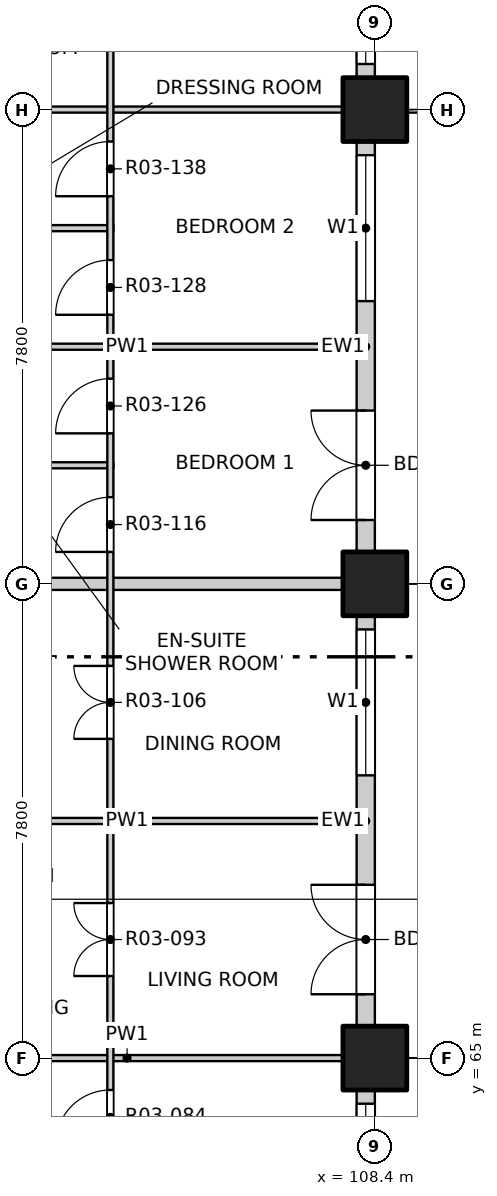
"""IFC4 building model, lengths in metres.
Left out: names, types, materials, properties, quantities, classifications, styles, units other than length and angle.
Written with IfcOpenShell. Run it as: python <this file> out.ifc"""

import sys

from ifc_helpers import new_model, si_unit, direction, frame, frame_2d, origin, origin_2d, place, context, subcontext, project, spatial, rectangle, extrude, element, fill, save


model = new_model("IFC4")
c1 = context("Model", 3, precision=1e-05, world=origin(), true_north=direction((0.0, 1.0)))
c2 = subcontext(c1, "Body", "Model", "MODEL_VIEW")
j1 = project(units=[si_unit("LENGTHUNIT", "METRE"), si_unit("PLANEANGLEUNIT", "RADIAN")], contexts=[c1])
p1 = place(None, origin())
s1 = spatial("IfcSite", under=j1, at=p1, CompositionType="ELEMENT")
p2 = place(p1, origin())
s2 = spatial("IfcBuilding", under=s1, at=p2, CompositionType="ELEMENT")
p3 = place(p2, frame((0.0, 0.0, 43.3)))
s3 = spatial("IfcBuildingStorey", under=s2, at=p3, CompositionType="ELEMENT", Elevation=43.3)
for number, where, z_axis, x_axis in (
    (1, (108.4, 65.0, -0.25), (0.0, 0.0, 1.0), (1.0, 0.0, 0.0)),
    (2, (108.4, 72.8, -0.25), (0.0, 0.0, 1.0), (1.0, 0.0, 0.0)),
    (3, (108.4, 80.6, -0.25), (0.0, 0.0, 1.0), (1.0, 0.0, 0.0)),
):
    element("IfcColumn", number, at=place(p3, frame(where, z_axis=z_axis, x_axis=x_axis)), inside=s3, PredefinedType="COLUMN", context=c2, shape_type="SweptSolid", body=[
        extrude(rectangle(XDim=1.05, YDim=1.05, at=origin_2d()), origin(), (0.0, 0.0, 1.0), 3.35),
    ])
p4 = place(p3, frame((108.25, 57.725, 0.0), z_axis=(0.0, 0.0, 1.0), x_axis=(0.0, 1.0, 0.0)))
e4 = element("IfcWall", 4, at=p4, inside=s3, PredefinedType="SOLIDWALL", context=c2, shape_type="SweptSolid", body=[
    extrude(rectangle(XDim=6.75, YDim=0.3, at=frame_2d((3.375, 0.0))), origin(), (0.0, 0.0, 1.0), 3.1),
])
p5 = place(p4, frame((0.525, 0.0, 0.0)))
e5 = element("IfcOpeningElement", 5, at=p5, cuts=e4, PredefinedType="OPENING", context=c2, shape_type="SweptSolid", body=[
    extrude(rectangle(XDim=1.8, YDim=2.4, at=frame_2d((0.9, 1.2))), frame((0.0, 0.16, 0.0), z_axis=(0.0, -1.0, 0.0), x_axis=(1.0, 0.0, 0.0)), (0.0, 0.0, 1.0), 0.32),
])
p6 = place(p4, frame((4.125, 0.0, 0.9)))
e6 = element("IfcOpeningElement", 6, at=p6, cuts=e4, PredefinedType="OPENING", context=c2, shape_type="SweptSolid", body=[
    extrude(rectangle(XDim=2.4, YDim=1.8, at=frame_2d((1.2, 0.9))), frame((0.0, 0.16, 0.0), z_axis=(0.0, -1.0, 0.0), x_axis=(1.0, 0.0, 0.0)), (0.0, 0.0, 1.0), 0.32),
])
p7 = place(p3, frame((108.25, 65.525, 0.0), z_axis=(0.0, 0.0, 1.0), x_axis=(0.0, 1.0, 0.0)))
e7 = element("IfcWall", 7, at=p7, inside=s3, PredefinedType="SOLIDWALL", context=c2, shape_type="SweptSolid", body=[
    extrude(rectangle(XDim=6.75, YDim=0.3, at=frame_2d((3.375, 0.0))), origin(), (0.0, 0.0, 1.0), 3.1),
])
p8 = place(p7, frame((0.525, 0.0, 0.0)))
e8 = element("IfcOpeningElement", 8, at=p8, cuts=e7, PredefinedType="OPENING", context=c2, shape_type="SweptSolid", body=[
    extrude(rectangle(XDim=1.8, YDim=2.4, at=frame_2d((0.9, 1.2))), frame((0.0, 0.16, 0.0), z_axis=(0.0, -1.0, 0.0), x_axis=(1.0, 0.0, 0.0)), (0.0, 0.0, 1.0), 0.32),
])
p9 = place(p7, frame((4.125, 0.0, 0.9)))
e9 = element("IfcOpeningElement", 9, at=p9, cuts=e7, PredefinedType="OPENING", context=c2, shape_type="SweptSolid", body=[
    extrude(rectangle(XDim=2.4, YDim=1.8, at=frame_2d((1.2, 0.9))), frame((0.0, 0.16, 0.0), z_axis=(0.0, -1.0, 0.0), x_axis=(1.0, 0.0, 0.0)), (0.0, 0.0, 1.0), 0.32),
])
p10 = place(p3, frame((108.25, 73.325, 0.0), z_axis=(0.0, 0.0, 1.0), x_axis=(0.0, 1.0, 0.0)))
e10 = element("IfcWall", 10, at=p10, inside=s3, PredefinedType="SOLIDWALL", context=c2, shape_type="SweptSolid", body=[
    extrude(rectangle(XDim=6.75, YDim=0.3, at=frame_2d((3.375, 0.0))), origin(), (0.0, 0.0, 1.0), 3.1),
])
p11 = place(p10, frame((0.525, 0.0, 0.0)))
e11 = element("IfcOpeningElement", 11, at=p11, cuts=e10, PredefinedType="OPENING", context=c2, shape_type="SweptSolid", body=[
    extrude(rectangle(XDim=1.8, YDim=2.4, at=frame_2d((0.9, 1.2))), frame((0.0, 0.16, 0.0), z_axis=(0.0, -1.0, 0.0), x_axis=(1.0, 0.0, 0.0)), (0.0, 0.0, 1.0), 0.32),
])
p12 = place(p10, frame((4.125, 0.0, 0.9)))
e12 = element("IfcOpeningElement", 12, at=p12, cuts=e10, PredefinedType="OPENING", context=c2, shape_type="SweptSolid", body=[
    extrude(rectangle(XDim=2.4, YDim=1.8, at=frame_2d((1.2, 0.9))), frame((0.0, 0.16, 0.0), z_axis=(0.0, -1.0, 0.0), x_axis=(1.0, 0.0, 0.0)), (0.0, 0.0, 1.0), 0.32),
])
p13 = place(p3, frame((108.25, 81.125, 0.0), z_axis=(0.0, 0.0, 1.0), x_axis=(0.0, 1.0, 0.0)))
e13 = element("IfcWall", 13, at=p13, inside=s3, PredefinedType="SOLIDWALL", context=c2, shape_type="SweptSolid", body=[
    extrude(rectangle(XDim=3.375, YDim=0.3, at=frame_2d((1.688, 0.0))), origin(), (0.0, 0.0, 1.0), 3.1),
])
p14 = place(p13, frame((0.225, 0.0, 0.9)))
e14 = element("IfcOpeningElement", 14, at=p14, cuts=e13, PredefinedType="OPENING", context=c2, shape_type="SweptSolid", body=[
    extrude(rectangle(XDim=2.4, YDim=1.8, at=frame_2d((1.2, 0.9))), frame((0.0, 0.16, 0.0), z_axis=(0.0, -1.0, 0.0), x_axis=(1.0, 0.0, 0.0)), (0.0, 0.0, 1.0), 0.32),
])
for number, where, z_axis, x_axis in (
    (15, (100.55, 65.0, 0.0), (0.0, 0.0, 1.0), (1.0, 0.0, 0.0)),
    (16, (100.55, 68.9, 0.0), (0.0, 0.0, 1.0), (1.0, 0.0, 0.0)),
):
    element("IfcWall", number, at=place(p3, frame(where, z_axis=z_axis, x_axis=x_axis)), inside=s3, PredefinedType="PARTITIONING", context=c2, shape_type="SweptSolid", body=[
        extrude(rectangle(XDim=7.55, YDim=0.1, at=frame_2d((3.775, 0.0))), origin(), (0.0, 0.0, 1.0), 3.1),
    ])
p15 = place(p3, frame((96.6, 72.8, 0.0), z_axis=(0.0, 0.0, 1.0), x_axis=(1.0, 0.0, 0.0)))
e17 = element("IfcWall", 17, at=p15, inside=s3, PredefinedType="PARTITIONING", context=c2, shape_type="SweptSolid", body=[
    extrude(rectangle(XDim=11.5, YDim=0.2, at=frame_2d((5.75, 0.0))), origin(), (0.0, 0.0, 1.0), 3.1),
])
p16 = place(p3, frame((100.55, 74.75, 0.0), z_axis=(0.0, 0.0, 1.0), x_axis=(1.0, 0.0, 0.0)))
e18 = element("IfcWall", 18, at=p16, inside=s3, PredefinedType="PARTITIONING", context=c2, shape_type="SweptSolid", body=[
    extrude(rectangle(XDim=3.55, YDim=0.1, at=frame_2d((1.775, 0.0))), origin(), (0.0, 0.0, 1.0), 3.1),
])
p17 = place(p3, frame((100.55, 76.7, 0.0), z_axis=(0.0, 0.0, 1.0), x_axis=(1.0, 0.0, 0.0)))
e19 = element("IfcWall", 19, at=p17, inside=s3, PredefinedType="PARTITIONING", context=c2, shape_type="SweptSolid", body=[
    extrude(rectangle(XDim=7.55, YDim=0.1, at=frame_2d((3.775, 0.0))), origin(), (0.0, 0.0, 1.0), 3.1),
])
p18 = place(p3, frame((100.55, 78.65, 0.0), z_axis=(0.0, 0.0, 1.0), x_axis=(1.0, 0.0, 0.0)))
e20 = element("IfcWall", 20, at=p18, inside=s3, PredefinedType="PARTITIONING", context=c2, shape_type="SweptSolid", body=[
    extrude(rectangle(XDim=3.55, YDim=0.1, at=frame_2d((1.775, 0.0))), origin(), (0.0, 0.0, 1.0), 3.1),
])
p19 = place(p3, frame((100.55, 80.6, 0.0), z_axis=(0.0, 0.0, 1.0), x_axis=(1.0, 0.0, 0.0)))
e21 = element("IfcWall", 21, at=p19, inside=s3, PredefinedType="PARTITIONING", context=c2, shape_type="SweptSolid", body=[
    extrude(rectangle(XDim=7.55, YDim=0.1, at=frame_2d((3.775, 0.0))), origin(), (0.0, 0.0, 1.0), 3.1),
])
p20 = place(p3, frame((104.05, 41.9, 0.0), z_axis=(0.0, 0.0, 1.0), x_axis=(0.0, 1.0, 0.0)))
e22 = element("IfcWall", 22, at=p20, inside=s3, PredefinedType="PARTITIONING", context=c2, shape_type="SweptSolid", body=[
    extrude(rectangle(XDim=46.2, YDim=0.1, at=frame_2d((23.1, 0.0))), origin(), (0.0, 0.0, 1.0), 3.1),
])
p21 = place(p20, frame((1.05, 0.0, 0.0)))
e23 = element("IfcOpeningElement", 23, at=p21, cuts=e22, PredefinedType="OPENING", context=c2, shape_type="SweptSolid", body=[
    extrude(rectangle(XDim=1.2, YDim=2.1, at=frame_2d((0.6, 1.05))), frame((0.0, 0.06, 0.0), z_axis=(0.0, -1.0, 0.0), x_axis=(1.0, 0.0, 0.0)), (0.0, 0.0, 1.0), 0.12),
])
p22 = place(p20, frame((4.125, 0.0, 0.0)))
e24 = element("IfcOpeningElement", 24, at=p22, cuts=e22, PredefinedType="OPENING", context=c2, shape_type="SweptSolid", body=[
    extrude(rectangle(XDim=0.9, YDim=2.1, at=frame_2d((0.45, 1.05))), frame((0.0, 0.06, 0.0), z_axis=(0.0, -1.0, 0.0), x_axis=(1.0, 0.0, 0.0)), (0.0, 0.0, 1.0), 0.12),
])
p23 = place(p20, frame((6.075, 0.0, 0.0)))
e25 = element("IfcOpeningElement", 25, at=p23, cuts=e22, PredefinedType="OPENING", context=c2, shape_type="SweptSolid", body=[
    extrude(rectangle(XDim=0.9, YDim=2.1, at=frame_2d((0.45, 1.05))), frame((0.0, 0.06, 0.0), z_axis=(0.0, -1.0, 0.0), x_axis=(1.0, 0.0, 0.0)), (0.0, 0.0, 1.0), 0.12),
])
p24 = place(p20, frame((8.85, 0.0, 0.0)))
e26 = element("IfcOpeningElement", 26, at=p24, cuts=e22, PredefinedType="OPENING", context=c2, shape_type="SweptSolid", body=[
    extrude(rectangle(XDim=1.2, YDim=2.1, at=frame_2d((0.6, 1.05))), frame((0.0, 0.06, 0.0), z_axis=(0.0, -1.0, 0.0), x_axis=(1.0, 0.0, 0.0)), (0.0, 0.0, 1.0), 0.12),
])
p25 = place(p20, frame((11.925, 0.0, 0.0)))
e27 = element("IfcOpeningElement", 27, at=p25, cuts=e22, PredefinedType="OPENING", context=c2, shape_type="SweptSolid", body=[
    extrude(rectangle(XDim=0.9, YDim=2.1, at=frame_2d((0.45, 1.05))), frame((0.0, 0.06, 0.0), z_axis=(0.0, -1.0, 0.0), x_axis=(1.0, 0.0, 0.0)), (0.0, 0.0, 1.0), 0.12),
])
p26 = place(p20, frame((13.875, 0.0, 0.0)))
e28 = element("IfcOpeningElement", 28, at=p26, cuts=e22, PredefinedType="OPENING", context=c2, shape_type="SweptSolid", body=[
    extrude(rectangle(XDim=0.9, YDim=2.1, at=frame_2d((0.45, 1.05))), frame((0.0, 0.06, 0.0), z_axis=(0.0, -1.0, 0.0), x_axis=(1.0, 0.0, 0.0)), (0.0, 0.0, 1.0), 0.12),
])
p27 = place(p20, frame((15.825, 0.0, 0.0)))
e29 = element("IfcOpeningElement", 29, at=p27, cuts=e22, PredefinedType="OPENING", context=c2, shape_type="SweptSolid", body=[
    extrude(rectangle(XDim=0.9, YDim=2.1, at=frame_2d((0.45, 1.05))), frame((0.0, 0.06, 0.0), z_axis=(0.0, -1.0, 0.0), x_axis=(1.0, 0.0, 0.0)), (0.0, 0.0, 1.0), 0.12),
])
p28 = place(p20, frame((17.775, 0.0, 0.0)))
e30 = element("IfcOpeningElement", 30, at=p28, cuts=e22, PredefinedType="OPENING", context=c2, shape_type="SweptSolid", body=[
    extrude(rectangle(XDim=0.9, YDim=2.1, at=frame_2d((0.45, 1.05))), frame((0.0, 0.06, 0.0), z_axis=(0.0, -1.0, 0.0), x_axis=(1.0, 0.0, 0.0)), (0.0, 0.0, 1.0), 0.12),
])
p29 = place(p20, frame((19.725, 0.0, 0.0)))
e31 = element("IfcOpeningElement", 31, at=p29, cuts=e22, PredefinedType="OPENING", context=c2, shape_type="SweptSolid", body=[
    extrude(rectangle(XDim=0.9, YDim=2.1, at=frame_2d((0.45, 1.05))), frame((0.0, 0.06, 0.0), z_axis=(0.0, -1.0, 0.0), x_axis=(1.0, 0.0, 0.0)), (0.0, 0.0, 1.0), 0.12),
])
p30 = place(p20, frame((21.675, 0.0, 0.0)))
e32 = element("IfcOpeningElement", 32, at=p30, cuts=e22, PredefinedType="OPENING", context=c2, shape_type="SweptSolid", body=[
    extrude(rectangle(XDim=0.9, YDim=2.1, at=frame_2d((0.45, 1.05))), frame((0.0, 0.06, 0.0), z_axis=(0.0, -1.0, 0.0), x_axis=(1.0, 0.0, 0.0)), (0.0, 0.0, 1.0), 0.12),
])
p31 = place(p20, frame((24.45, 0.0, 0.0)))
e33 = element("IfcOpeningElement", 33, at=p31, cuts=e22, PredefinedType="OPENING", context=c2, shape_type="SweptSolid", body=[
    extrude(rectangle(XDim=1.2, YDim=2.1, at=frame_2d((0.6, 1.05))), frame((0.0, 0.06, 0.0), z_axis=(0.0, -1.0, 0.0), x_axis=(1.0, 0.0, 0.0)), (0.0, 0.0, 1.0), 0.12),
])
p32 = place(p20, frame((28.35, 0.0, 0.0)))
e34 = element("IfcOpeningElement", 34, at=p32, cuts=e22, PredefinedType="OPENING", context=c2, shape_type="SweptSolid", body=[
    extrude(rectangle(XDim=1.2, YDim=2.1, at=frame_2d((0.6, 1.05))), frame((0.0, 0.06, 0.0), z_axis=(0.0, -1.0, 0.0), x_axis=(1.0, 0.0, 0.0)), (0.0, 0.0, 1.0), 0.12),
])
p33 = place(p20, frame((31.425, 0.0, 0.0)))
e35 = element("IfcOpeningElement", 35, at=p33, cuts=e22, PredefinedType="OPENING", context=c2, shape_type="SweptSolid", body=[
    extrude(rectangle(XDim=0.9, YDim=2.1, at=frame_2d((0.45, 1.05))), frame((0.0, 0.06, 0.0), z_axis=(0.0, -1.0, 0.0), x_axis=(1.0, 0.0, 0.0)), (0.0, 0.0, 1.0), 0.12),
])
p34 = place(p20, frame((33.375, 0.0, 0.0)))
e36 = element("IfcOpeningElement", 36, at=p34, cuts=e22, PredefinedType="OPENING", context=c2, shape_type="SweptSolid", body=[
    extrude(rectangle(XDim=0.9, YDim=2.1, at=frame_2d((0.45, 1.05))), frame((0.0, 0.06, 0.0), z_axis=(0.0, -1.0, 0.0), x_axis=(1.0, 0.0, 0.0)), (0.0, 0.0, 1.0), 0.12),
])
p35 = place(p20, frame((35.325, 0.0, 0.0)))
e37 = element("IfcOpeningElement", 37, at=p35, cuts=e22, PredefinedType="OPENING", context=c2, shape_type="SweptSolid", body=[
    extrude(rectangle(XDim=0.9, YDim=2.1, at=frame_2d((0.45, 1.05))), frame((0.0, 0.06, 0.0), z_axis=(0.0, -1.0, 0.0), x_axis=(1.0, 0.0, 0.0)), (0.0, 0.0, 1.0), 0.12),
])
p36 = place(p20, frame((37.275, 0.0, 0.0)))
e38 = element("IfcOpeningElement", 38, at=p36, cuts=e22, PredefinedType="OPENING", context=c2, shape_type="SweptSolid", body=[
    extrude(rectangle(XDim=0.9, YDim=2.1, at=frame_2d((0.45, 1.05))), frame((0.0, 0.06, 0.0), z_axis=(0.0, -1.0, 0.0), x_axis=(1.0, 0.0, 0.0)), (0.0, 0.0, 1.0), 0.12),
])
p37 = place(p20, frame((40.05, 0.0, 0.0)))
e39 = element("IfcOpeningElement", 39, at=p37, cuts=e22, PredefinedType="OPENING", context=c2, shape_type="SweptSolid", body=[
    extrude(rectangle(XDim=1.2, YDim=2.1, at=frame_2d((0.6, 1.05))), frame((0.0, 0.06, 0.0), z_axis=(0.0, -1.0, 0.0), x_axis=(1.0, 0.0, 0.0)), (0.0, 0.0, 1.0), 0.12),
])
p38 = place(p20, frame((43.95, 0.0, 0.0)))
e40 = element("IfcOpeningElement", 40, at=p38, cuts=e22, PredefinedType="OPENING", context=c2, shape_type="SweptSolid", body=[
    extrude(rectangle(XDim=1.2, YDim=2.1, at=frame_2d((0.6, 1.05))), frame((0.0, 0.06, 0.0), z_axis=(0.0, -1.0, 0.0), x_axis=(1.0, 0.0, 0.0)), (0.0, 0.0, 1.0), 0.12),
])
p39 = place(p6, origin())
e41 = element("IfcWindow", 41, at=p39, inside=s3, PartitioningType="DOUBLE_PANEL_VERTICAL", PredefinedType="WINDOW", context=c2, shape_type="SweptSolid", body=[
    extrude(rectangle(XDim=2.4, YDim=1.8, at=frame_2d((1.2, 0.9))), frame((0.0, 0.03, 0.0), z_axis=(0.0, -1.0, 0.0), x_axis=(1.0, 0.0, 0.0)), (0.0, 0.0, 1.0), 0.06),
])
fill(e6, e41)
p40 = place(p8, origin())
e42 = element("IfcDoor", 42, at=p40, inside=s3, OperationType="DOUBLE_DOOR_SINGLE_SWING", PredefinedType="DOOR", context=c2, shape_type="SweptSolid", body=[
    extrude(rectangle(XDim=1.8, YDim=2.4, at=frame_2d((0.9, 1.2))), frame((0.0, 0.025, 0.0), z_axis=(0.0, -1.0, 0.0), x_axis=(1.0, 0.0, 0.0)), (0.0, 0.0, 1.0), 0.05),
])
fill(e8, e42)
p41 = place(p9, origin())
e43 = element("IfcWindow", 43, at=p41, inside=s3, PartitioningType="DOUBLE_PANEL_VERTICAL", PredefinedType="WINDOW", context=c2, shape_type="SweptSolid", body=[
    extrude(rectangle(XDim=2.4, YDim=1.8, at=frame_2d((1.2, 0.9))), frame((0.0, 0.03, 0.0), z_axis=(0.0, -1.0, 0.0), x_axis=(1.0, 0.0, 0.0)), (0.0, 0.0, 1.0), 0.06),
])
fill(e9, e43)
p42 = place(p11, origin())
e44 = element("IfcDoor", 44, at=p42, inside=s3, OperationType="DOUBLE_DOOR_SINGLE_SWING", PredefinedType="DOOR", context=c2, shape_type="SweptSolid", body=[
    extrude(rectangle(XDim=1.8, YDim=2.4, at=frame_2d((0.9, 1.2))), frame((0.0, 0.025, 0.0), z_axis=(0.0, -1.0, 0.0), x_axis=(1.0, 0.0, 0.0)), (0.0, 0.0, 1.0), 0.05),
])
fill(e11, e44)
p43 = place(p12, origin())
e45 = element("IfcWindow", 45, at=p43, inside=s3, PartitioningType="DOUBLE_PANEL_VERTICAL", PredefinedType="WINDOW", context=c2, shape_type="SweptSolid", body=[
    extrude(rectangle(XDim=2.4, YDim=1.8, at=frame_2d((1.2, 0.9))), frame((0.0, 0.03, 0.0), z_axis=(0.0, -1.0, 0.0), x_axis=(1.0, 0.0, 0.0)), (0.0, 0.0, 1.0), 0.06),
])
fill(e12, e45)
p44 = place(p14, origin())
e46 = element("IfcWindow", 46, at=p44, inside=s3, PartitioningType="DOUBLE_PANEL_VERTICAL", PredefinedType="WINDOW", context=c2, shape_type="SweptSolid", body=[
    extrude(rectangle(XDim=2.4, YDim=1.8, at=frame_2d((1.2, 0.9))), frame((0.0, 0.03, 0.0), z_axis=(0.0, -1.0, 0.0), x_axis=(1.0, 0.0, 0.0)), (0.0, 0.0, 1.0), 0.06),
])
fill(e14, e46)
p45 = place(p30, origin())
e47 = element("IfcDoor", 47, at=p45, inside=s3, OperationType="SINGLE_SWING_LEFT", PredefinedType="DOOR", context=c2, shape_type="SweptSolid", body=[
    extrude(rectangle(XDim=0.9, YDim=2.1, at=frame_2d((0.45, 1.05))), frame((0.0, 0.025, 0.0), z_axis=(0.0, -1.0, 0.0), x_axis=(1.0, 0.0, 0.0)), (0.0, 0.0, 1.0), 0.05),
])
fill(e32, e47)
p46 = place(p31, origin())
e48 = element("IfcDoor", 48, at=p46, inside=s3, OperationType="DOUBLE_DOOR_SINGLE_SWING", PredefinedType="DOOR", context=c2, shape_type="SweptSolid", body=[
    extrude(rectangle(XDim=1.2, YDim=2.1, at=frame_2d((0.6, 1.05))), frame((0.0, 0.025, 0.0), z_axis=(0.0, -1.0, 0.0), x_axis=(1.0, 0.0, 0.0)), (0.0, 0.0, 1.0), 0.05),
])
fill(e33, e48)
p47 = place(p32, origin())
e49 = element("IfcDoor", 49, at=p47, inside=s3, OperationType="DOUBLE_DOOR_SINGLE_SWING", PredefinedType="DOOR", context=c2, shape_type="SweptSolid", body=[
    extrude(rectangle(XDim=1.2, YDim=2.1, at=frame_2d((0.6, 1.05))), frame((0.0, 0.025, 0.0), z_axis=(0.0, -1.0, 0.0), x_axis=(1.0, 0.0, 0.0)), (0.0, 0.0, 1.0), 0.05),
])
fill(e34, e49)
p48 = place(p33, origin())
e50 = element("IfcDoor", 50, at=p48, inside=s3, OperationType="SINGLE_SWING_LEFT", PredefinedType="DOOR", context=c2, shape_type="SweptSolid", body=[
    extrude(rectangle(XDim=0.9, YDim=2.1, at=frame_2d((0.45, 1.05))), frame((0.0, 0.025, 0.0), z_axis=(0.0, -1.0, 0.0), x_axis=(1.0, 0.0, 0.0)), (0.0, 0.0, 1.0), 0.05),
])
fill(e35, e50)
p49 = place(p34, origin())
e51 = element("IfcDoor", 51, at=p49, inside=s3, OperationType="SINGLE_SWING_LEFT", PredefinedType="DOOR", context=c2, shape_type="SweptSolid", body=[
    extrude(rectangle(XDim=0.9, YDim=2.1, at=frame_2d((0.45, 1.05))), frame((0.0, 0.025, 0.0), z_axis=(0.0, -1.0, 0.0), x_axis=(1.0, 0.0, 0.0)), (0.0, 0.0, 1.0), 0.05),
])
fill(e36, e51)
p50 = place(p35, origin())
e52 = element("IfcDoor", 52, at=p50, inside=s3, OperationType="SINGLE_SWING_LEFT", PredefinedType="DOOR", context=c2, shape_type="SweptSolid", body=[
    extrude(rectangle(XDim=0.9, YDim=2.1, at=frame_2d((0.45, 1.05))), frame((0.0, 0.025, 0.0), z_axis=(0.0, -1.0, 0.0), x_axis=(1.0, 0.0, 0.0)), (0.0, 0.0, 1.0), 0.05),
])
fill(e37, e52)
p51 = place(p36, origin())
e53 = element("IfcDoor", 53, at=p51, inside=s3, OperationType="SINGLE_SWING_LEFT", PredefinedType="DOOR", context=c2, shape_type="SweptSolid", body=[
    extrude(rectangle(XDim=0.9, YDim=2.1, at=frame_2d((0.45, 1.05))), frame((0.0, 0.025, 0.0), z_axis=(0.0, -1.0, 0.0), x_axis=(1.0, 0.0, 0.0)), (0.0, 0.0, 1.0), 0.05),
])
fill(e38, e53)
save(model, sys.argv[1])
